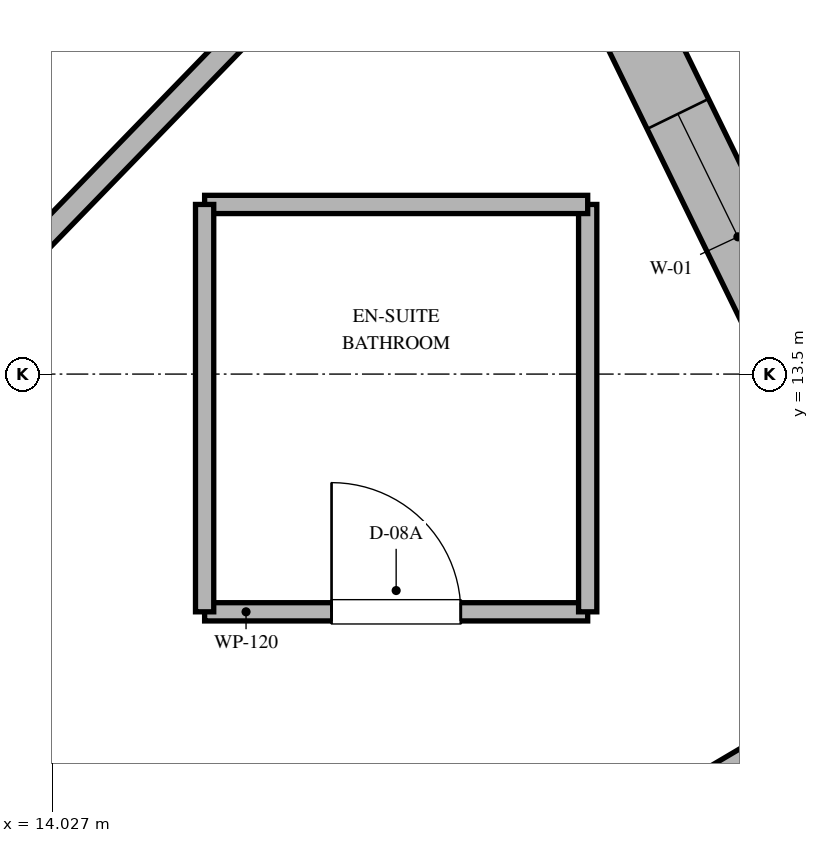
"""IFC4 building model, lengths in metres.
Left out: names, types, materials, properties, quantities, classifications, styles, units other than length and angle.
Written with IfcOpenShell. Run it as: python <this file> out.ifc"""

import sys

from ifc_helpers import new_model, si_unit, direction, frame, frame_2d, origin, place, context, subcontext, project, spatial, rectangle, extrude, element, fill, save


model = new_model("IFC4")
c1 = context("Model", 3, precision=1e-05, world=origin(), true_north=direction((0.0, 1.0)))
c2 = subcontext(c1, "Body", "Model", "MODEL_VIEW")
j1 = project(units=[si_unit("LENGTHUNIT", "METRE"), si_unit("PLANEANGLEUNIT", "RADIAN")], contexts=[c1])
p1 = place(None, origin())
s1 = spatial("IfcSite", under=j1, at=p1, CompositionType="ELEMENT")
p2 = place(p1, origin())
s2 = spatial("IfcBuilding", under=s1, at=p2, CompositionType="ELEMENT")
p3 = place(p2, frame((0.0, 0.0, 34.2)))
s3 = spatial("IfcBuildingStorey", under=s2, at=p3, CompositionType="ELEMENT", Elevation=34.2)
p4 = place(p3, frame((24.336, 2.532, 0.0), z_axis=(0.0, 0.0, 1.0), x_axis=(-0.438931326393, 0.898520612291, 0.0)))
e1 = element("IfcWall", 1, at=p4, inside=s3, PredefinedType="SOLIDWALL", context=c2, shape_type="SweptSolid", body=[
    extrude(rectangle(XDim=20.623, YDim=0.45, at=frame_2d((10.312, 0.0))), origin(), (0.0, 0.0, 1.0), 3.4),
])
p5 = place(p4, frame((6.47, 0.0, 0.8)))
e2 = element("IfcOpeningElement", 2, at=p5, cuts=e1, PredefinedType="OPENING", context=c2, shape_type="SweptSolid", body=[
    extrude(rectangle(XDim=1.8, YDim=1.8, at=frame_2d((0.9, 0.9))), frame((0.0, 0.235, 0.0), z_axis=(0.0, -1.0, 0.0), x_axis=(1.0, 0.0, 0.0)), (0.0, 0.0, 1.0), 0.47),
])
p6 = place(p4, frame((12.311, 0.0, 0.8)))
e3 = element("IfcOpeningElement", 3, at=p6, cuts=e1, PredefinedType="OPENING", context=c2, shape_type="SweptSolid", body=[
    extrude(rectangle(XDim=1.8, YDim=1.8, at=frame_2d((0.9, 0.9))), frame((0.0, 0.235, 0.0), z_axis=(0.0, -1.0, 0.0), x_axis=(1.0, 0.0, 0.0)), (0.0, 0.0, 1.0), 0.47),
])
p7 = place(p4, frame((17.66, 0.0, 0.8)))
e4 = element("IfcOpeningElement", 4, at=p7, cuts=e1, PredefinedType="OPENING", context=c2, shape_type="SweptSolid", body=[
    extrude(rectangle(XDim=1.8, YDim=1.8, at=frame_2d((0.9, 0.9))), frame((0.0, 0.235, 0.0), z_axis=(0.0, -1.0, 0.0), x_axis=(1.0, 0.0, 0.0)), (0.0, 0.0, 1.0), 0.47),
])
p8 = place(p4, frame((1.214, 0.0, 0.8)))
e5 = element("IfcOpeningElement", 5, at=p8, cuts=e1, PredefinedType="OPENING", context=c2, shape_type="SweptSolid", body=[
    extrude(rectangle(XDim=1.8, YDim=1.8, at=frame_2d((0.9, 0.9))), frame((0.0, 0.235, 0.0), z_axis=(0.0, -1.0, 0.0), x_axis=(1.0, 0.0, 0.0)), (0.0, 0.0, 1.0), 0.47),
])
p9 = place(p3, frame((11.35, 6.698, 0.0), z_axis=(0.0, 0.0, 1.0), x_axis=(0.861198232886, 0.508269223614, 0.0)))
e6 = element("IfcWall", 6, at=p9, inside=s3, PredefinedType="PARTITIONING", context=c2, shape_type="SweptSolid", body=[
    extrude(rectangle(XDim=9.87, YDim=0.15, at=frame_2d((4.935, 0.0))), origin(), (0.0, 0.0, 1.0), 2.54),
])
p10 = place(p3, frame((9.558, 9.85, 0.0), z_axis=(0.0, 0.0, 1.0), x_axis=(0.69638346089, 0.717669893056, 0.0)))
e7 = element("IfcWall", 7, at=p10, inside=s3, PredefinedType="PARTITIONING", context=c2, shape_type="SweptSolid", body=[
    extrude(rectangle(XDim=10.701, YDim=0.15, at=frame_2d((5.351, 0.0))), origin(), (0.0, 0.0, 1.0), 2.54),
])
p11 = place(p3, frame((15.029, 11.936, 0.0), z_axis=(0.0, 0.0, 1.0), x_axis=(1.0, 0.0, 0.0)))
e8 = element("IfcWall", 8, at=p11, inside=s3, PredefinedType="PARTITIONING", context=c2, shape_type="SweptSolid", body=[
    extrude(rectangle(XDim=2.52, YDim=0.12, at=frame_2d((1.26, 0.0))), origin(), (0.0, 0.0, 1.0), 2.927),
])
p12 = place(p11, frame((0.835, 0.0, 0.0)))
e9 = element("IfcOpeningElement", 9, at=p12, cuts=e8, PredefinedType="OPENING", context=c2, shape_type="SweptSolid", body=[
    extrude(rectangle(XDim=0.85, YDim=2.03, at=frame_2d((0.425, 1.015))), frame((0.0, 0.07, 0.0), z_axis=(0.0, -1.0, 0.0), x_axis=(1.0, 0.0, 0.0)), (0.0, 0.0, 1.0), 0.14),
])
p13 = place(p3, frame((17.549, 11.936, 0.0), z_axis=(0.0, 0.0, 1.0), x_axis=(0.0, 1.0, 0.0)))
e10 = element("IfcWall", 10, at=p13, inside=s3, PredefinedType="PARTITIONING", context=c2, shape_type="SweptSolid", body=[
    extrude(rectangle(XDim=2.68, YDim=0.12, at=frame_2d((1.34, 0.0))), origin(), (0.0, 0.0, 1.0), 3.4),
])
p14 = place(p3, frame((17.549, 14.616, 0.0), z_axis=(0.0, 0.0, 1.0), x_axis=(-1.0, 0.0, 0.0)))
e11 = element("IfcWall", 11, at=p14, inside=s3, PredefinedType="PARTITIONING", context=c2, shape_type="SweptSolid", body=[
    extrude(rectangle(XDim=2.52, YDim=0.12, at=frame_2d((1.26, 0.0))), origin(), (0.0, 0.0, 1.0), 3.4),
])
p15 = place(p3, frame((15.029, 14.616, 0.0), z_axis=(0.0, 0.0, 1.0), x_axis=(0.0, -1.0, 0.0)))
e12 = element("IfcWall", 12, at=p15, inside=s3, PredefinedType="PARTITIONING", context=c2, shape_type="SweptSolid", body=[
    extrude(rectangle(XDim=2.68, YDim=0.12, at=frame_2d((1.34, 0.0))), origin(), (0.0, 0.0, 1.0), 2.927),
])
p16 = place(p6, origin())
e13 = element("IfcWindow", 13, at=p16, inside=s3, PartitioningType="SINGLE_PANEL", PredefinedType="WINDOW", context=c2, shape_type="SweptSolid", body=[
    extrude(rectangle(XDim=1.8, YDim=1.8, at=frame_2d((0.9, 0.9))), frame((0.0, 0.03, 0.0), z_axis=(0.0, -1.0, 0.0), x_axis=(1.0, 0.0, 0.0)), (0.0, 0.0, 1.0), 0.06),
])
fill(e3, e13)
p17 = place(p12, origin())
e14 = element("IfcDoor", 14, at=p17, inside=s3, OperationType="SINGLE_SWING_LEFT", PredefinedType="DOOR", context=c2, shape_type="SweptSolid", body=[
    extrude(rectangle(XDim=0.85, YDim=2.03, at=frame_2d((0.425, 1.015))), frame((0.0, 0.025, 0.0), z_axis=(0.0, -1.0, 0.0), x_axis=(1.0, 0.0, 0.0)), (0.0, 0.0, 1.0), 0.05),
])
fill(e9, e14)
save(model, sys.argv[1])
